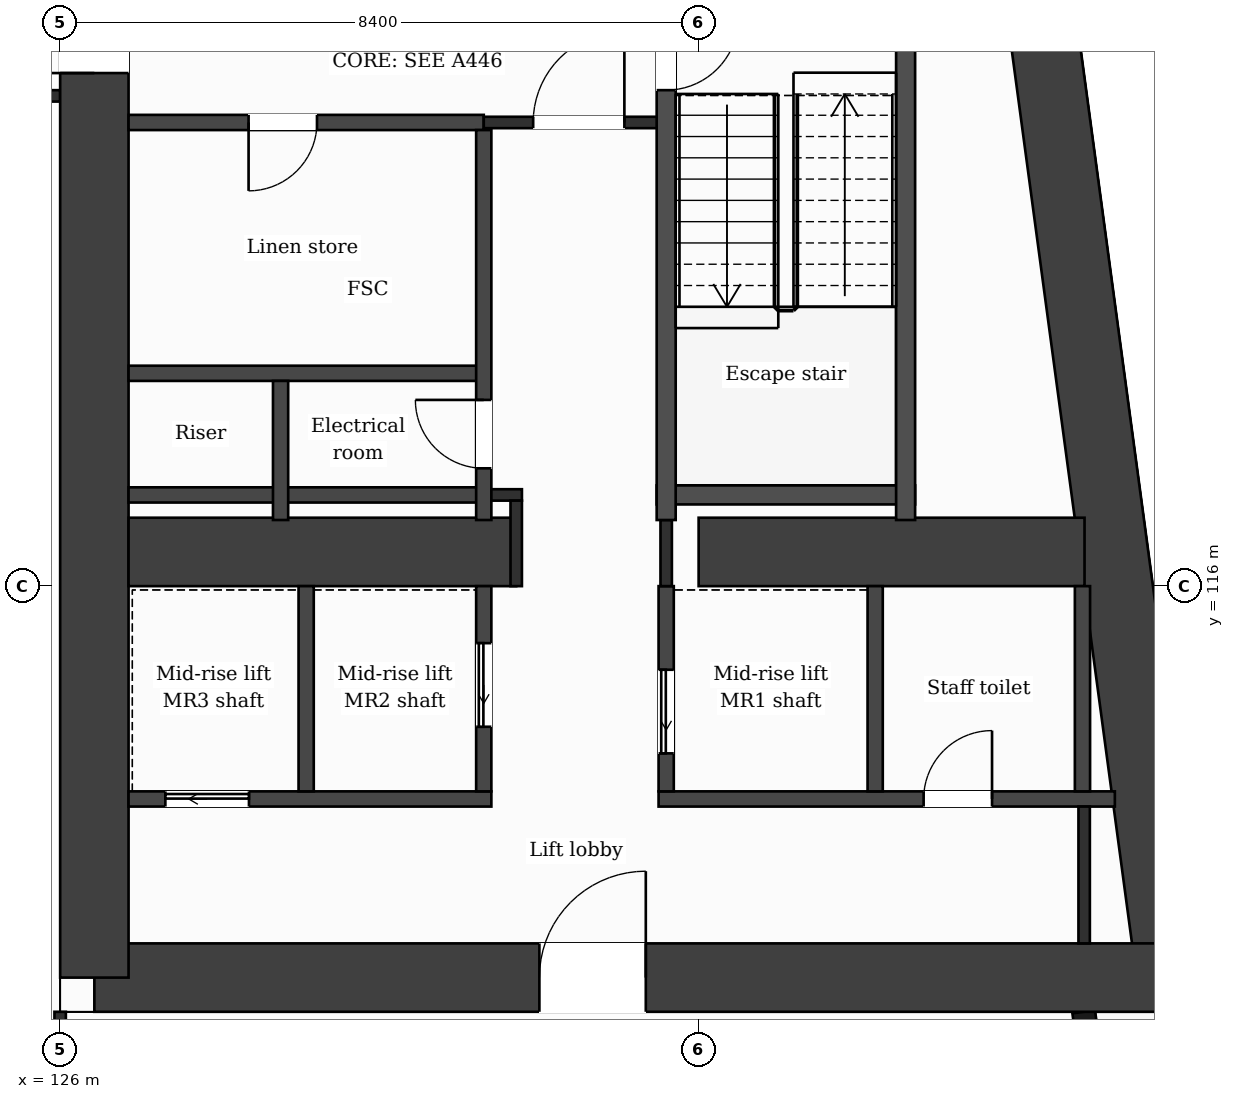
"""IFC4 building model, lengths in metres.
Left out: names, types, materials, properties, quantities, classifications, styles, units other than length and angle.
Written with IfcOpenShell. Run it as: python <this file> out.ifc"""

import sys

from ifc_helpers import new_model, si_unit, direction, frame, frame_2d, origin, place, context, subcontext, project, spatial, rectangle, extrude, element, fill, save


model = new_model("IFC4")
c1 = context("Model", 3, precision=1e-05, world=origin(), true_north=direction((0.0, 1.0)))
c2 = subcontext(c1, "Body", "Model", "MODEL_VIEW")
j1 = project(units=[si_unit("LENGTHUNIT", "METRE"), si_unit("PLANEANGLEUNIT", "RADIAN")], contexts=[c1])
p1 = place(None, origin())
s1 = spatial("IfcSite", under=j1, at=p1, CompositionType="ELEMENT")
p2 = place(p1, origin())
s2 = spatial("IfcBuilding", under=s1, at=p2, CompositionType="ELEMENT")
p3 = place(p2, frame((0.0, 0.0, 188.5)))
s3 = spatial("IfcBuildingStorey", under=s2, at=p3, CompositionType="ELEMENT", Elevation=188.5)
p4 = place(p3, frame((137.776, 131.95, 0.0), z_axis=(0.0, 0.0, 1.0), x_axis=(0.133421759112, -0.991059349482, 0.0)))
e1 = element("IfcWall", 1, at=p4, inside=s3, PredefinedType="SHEAR", context=c2, shape_type="SweptSolid", body=[
    extrude(rectangle(XDim=21.29, YDim=0.9, at=frame_2d((10.645, 0.0))), origin(), (0.0, 0.0, 1.0), 3.7),
])
p5 = place(p3, frame((140.616, 110.85, 0.0), z_axis=(0.0, 0.0, 1.0), x_axis=(-1.0, 0.0, 0.0)))
e2 = element("IfcWall", 2, at=p5, inside=s3, PredefinedType="SHEAR", context=c2, shape_type="SweptSolid", body=[
    extrude(rectangle(XDim=14.166, YDim=0.9, at=frame_2d((7.083, 0.0))), origin(), (0.0, 0.0, 1.0), 3.7),
])
p6 = place(p5, frame((6.911, 0.0, 0.0)))
e3 = element("IfcOpeningElement", 3, at=p6, cuts=e2, PredefinedType="OPENING", context=c2, shape_type="SweptSolid", body=[
    extrude(rectangle(XDim=1.4, YDim=2.1, at=frame_2d((0.7, 1.05))), frame((0.0, 0.46, 0.0), z_axis=(0.0, -1.0, 0.0), x_axis=(1.0, 0.0, 0.0)), (0.0, 0.0, 1.0), 0.92),
])
p7 = place(p3, frame((126.45, 110.85, 0.0), z_axis=(0.0, 0.0, 1.0), x_axis=(0.0, 1.0, 0.0)))
e4 = element("IfcWall", 4, at=p7, inside=s3, PredefinedType="SHEAR", context=c2, shape_type="SweptSolid", body=[
    extrude(rectangle(XDim=21.1, YDim=0.9, at=frame_2d((10.55, 0.0))), origin(), (0.0, 0.0, 1.0), 3.7),
])
p8 = place(p7, frame((11.9, 0.0, 0.0)))
e5 = element("IfcOpeningElement", 5, at=p8, cuts=e4, PredefinedType="OPENING", context=c2, shape_type="SweptSolid", body=[
    extrude(rectangle(XDim=1.4, YDim=2.1, at=frame_2d((0.7, 1.05))), frame((0.0, 0.46, 0.0), z_axis=(0.0, -1.0, 0.0), x_axis=(1.0, 0.0, 0.0)), (0.0, 0.0, 1.0), 0.92),
])
p9 = place(p3, frame((126.9, 116.45, 0.0), z_axis=(0.0, 0.0, 1.0), x_axis=(1.0, 0.0, 0.0)))
e6 = element("IfcWall", 6, at=p9, inside=s3, PredefinedType="SHEAR", context=c2, shape_type="SweptSolid", body=[
    extrude(rectangle(XDim=5.1, YDim=0.9, at=frame_2d((2.55, 0.0))), origin(), (0.0, 0.0, 1.0), 3.7),
])
p10 = place(p3, frame((134.4, 116.45, 0.0), z_axis=(0.0, 0.0, 1.0), x_axis=(1.0, 0.0, 0.0)))
e7 = element("IfcWall", 7, at=p10, inside=s3, PredefinedType="SHEAR", context=c2, shape_type="SweptSolid", body=[
    extrude(rectangle(XDim=5.077, YDim=0.9, at=frame_2d((2.539, 0.0))), origin(), (0.0, 0.0, 1.0), 3.7),
])
p11 = place(p3, frame((140.348, 103.85, 0.0), z_axis=(0.0, 0.0, 1.0), x_axis=(-0.133431549479, 0.991058031401, 0.0)))
e8 = element("IfcWall", 8, at=p11, inside=s3, PredefinedType="SOLIDWALL", context=c2, shape_type="SweptSolid", body=[
    extrude(rectangle(XDim=6.609, YDim=0.3, at=frame_2d((3.304, 0.0))), origin(), (0.0, 0.0, 1.0), 3.25),
])
p12 = place(p11, frame((0.737, 0.0, 0.9)))
e9 = element("IfcOpeningElement", 9, at=p12, cuts=e8, PredefinedType="OPENING", context=c2, shape_type="SweptSolid", body=[
    extrude(rectangle(XDim=1.2, YDim=2.1, at=frame_2d((0.6, 1.05))), frame((0.0, 0.16, 0.0), z_axis=(0.0, -1.0, 0.0), x_axis=(1.0, 0.0, 0.0)), (0.0, 0.0, 1.0), 0.32),
])
p13 = place(p11, frame((3.991, 0.0, 0.0)))
e10 = element("IfcOpeningElement", 10, at=p13, cuts=e8, PredefinedType="OPENING", context=c2, shape_type="SweptSolid", body=[
    extrude(rectangle(XDim=1.2, YDim=2.4, at=frame_2d((0.6, 1.2))), frame((0.0, 0.16, 0.0), z_axis=(0.0, -1.0, 0.0), x_axis=(1.0, 0.0, 0.0)), (0.0, 0.0, 1.0), 0.32),
])
p14 = place(p3, frame((126.9, 113.2, 0.0), z_axis=(0.0, 0.0, 1.0), x_axis=(1.0, 0.0, 0.0)))
e11 = element("IfcWall", 11, at=p14, inside=s3, PredefinedType="PARTITIONING", context=c2, shape_type="SweptSolid", body=[
    extrude(rectangle(XDim=4.773, YDim=0.2, at=frame_2d((2.387, 0.0))), origin(), (0.0, 0.0, 1.0), 3.25),
])
p15 = place(p14, frame((0.484, 0.0, 0.0)))
e12 = element("IfcOpeningElement", 12, at=p15, cuts=e11, PredefinedType="OPENING", context=c2, shape_type="SweptSolid", body=[
    extrude(rectangle(XDim=1.1, YDim=2.1, at=frame_2d((0.55, 1.05))), frame((0.0, 0.11, 0.0), z_axis=(0.0, -1.0, 0.0), x_axis=(1.0, 0.0, 0.0)), (0.0, 0.0, 1.0), 0.22),
])
p16 = place(p3, frame((133.873, 113.2, 0.0), z_axis=(0.0, 0.0, 1.0), x_axis=(1.0, 0.0, 0.0)))
e13 = element("IfcWall", 13, at=p16, inside=s3, PredefinedType="PARTITIONING", context=c2, shape_type="SweptSolid", body=[
    extrude(rectangle(XDim=6.003, YDim=0.2, at=frame_2d((3.001, 0.0))), origin(), (0.0, 0.0, 1.0), 3.25),
])
p17 = place(p16, frame((3.487, 0.0, 0.0)))
e14 = element("IfcOpeningElement", 14, at=p17, cuts=e13, PredefinedType="OPENING", context=c2, shape_type="SweptSolid", body=[
    extrude(rectangle(XDim=0.9, YDim=2.1, at=frame_2d((0.45, 1.05))), frame((0.0, 0.11, 0.0), z_axis=(0.0, -1.0, 0.0), x_axis=(1.0, 0.0, 0.0)), (0.0, 0.0, 1.0), 0.22),
])
p18 = place(p3, frame((126.9, 117.2, 0.0), z_axis=(0.0, 0.0, 1.0), x_axis=(1.0, 0.0, 0.0)))
e15 = element("IfcWall", 15, at=p18, inside=s3, PredefinedType="PARTITIONING", context=c2, shape_type="SweptSolid", body=[
    extrude(rectangle(XDim=4.673, YDim=0.2, at=frame_2d((2.336, 0.0))), origin(), (0.0, 0.0, 1.0), 3.25),
])
p19 = place(p3, frame((131.573, 117.2, 0.0), z_axis=(0.0, 0.0, 1.0), x_axis=(1.0, 0.0, 0.0)))
e16 = element("IfcWall", 16, at=p19, inside=s3, PredefinedType="PARTITIONING", context=c2, shape_type="SweptSolid", body=[
    extrude(rectangle(XDim=0.502, YDim=0.15, at=frame_2d((0.251, 0.0))), origin(), (0.0, 0.0, 1.0), 3.25),
])
p20 = place(p3, frame((133.848, 117.2, 0.0), z_axis=(0.0, 0.0, 1.0), x_axis=(1.0, 0.0, 0.0)))
e17 = element("IfcWall", 17, at=p20, inside=s3, PredefinedType="PARTITIONING", context=c2, shape_type="SweptSolid", body=[
    extrude(rectangle(XDim=3.4, YDim=0.25, at=frame_2d((1.7, 0.0))), origin(), (0.0, 0.0, 1.0), 3.25),
])
p21 = place(p3, frame((126.9, 118.8, 0.0), z_axis=(0.0, 0.0, 1.0), x_axis=(1.0, 0.0, 0.0)))
e18 = element("IfcWall", 18, at=p21, inside=s3, PredefinedType="PARTITIONING", context=c2, shape_type="SweptSolid", body=[
    extrude(rectangle(XDim=4.673, YDim=0.2, at=frame_2d((2.336, 0.0))), origin(), (0.0, 0.0, 1.0), 3.25),
])
p22 = place(p3, frame((126.9, 122.1, 0.0), z_axis=(0.0, 0.0, 1.0), x_axis=(1.0, 0.0, 0.0)))
e19 = element("IfcWall", 19, at=p22, inside=s3, PredefinedType="PARTITIONING", context=c2, shape_type="SweptSolid", body=[
    extrude(rectangle(XDim=4.673, YDim=0.2, at=frame_2d((2.336, 0.0))), origin(), (0.0, 0.0, 1.0), 3.25),
])
p23 = place(p22, frame((1.579, 0.0, 0.0)))
e20 = element("IfcOpeningElement", 20, at=p23, cuts=e19, PredefinedType="OPENING", context=c2, shape_type="SweptSolid", body=[
    extrude(rectangle(XDim=0.9, YDim=2.1, at=frame_2d((0.45, 1.05))), frame((0.0, 0.11, 0.0), z_axis=(0.0, -1.0, 0.0), x_axis=(1.0, 0.0, 0.0)), (0.0, 0.0, 1.0), 0.22),
])
p24 = place(p3, frame((131.573, 122.1, 0.0), z_axis=(0.0, 0.0, 1.0), x_axis=(1.0, 0.0, 0.0)))
e21 = element("IfcWall", 21, at=p24, inside=s3, PredefinedType="PARTITIONING", context=c2, shape_type="SweptSolid", body=[
    extrude(rectangle(XDim=2.4, YDim=0.15, at=frame_2d((1.2, 0.0))), origin(), (0.0, 0.0, 1.0), 3.25),
])
p25 = place(p24, frame((0.65, 0.0, 0.0)))
e22 = element("IfcOpeningElement", 22, at=p25, cuts=e21, PredefinedType="OPENING", context=c2, shape_type="SweptSolid", body=[
    extrude(rectangle(XDim=1.2, YDim=2.1, at=frame_2d((0.6, 1.05))), frame((0.0, 0.085, 0.0), z_axis=(0.0, -1.0, 0.0), x_axis=(1.0, 0.0, 0.0)), (0.0, 0.0, 1.0), 0.17),
])
p26 = place(p3, frame((100.8, 122.45, 0.0), z_axis=(0.0, 0.0, 1.0), x_axis=(1.0, 0.0, 0.0)))
e23 = element("IfcWall", 23, at=p26, inside=s3, PredefinedType="PARTITIONING", context=c2, shape_type="SweptSolid", body=[
    extrude(rectangle(XDim=25.2, YDim=0.15, at=frame_2d((12.6, 0.0))), origin(), (0.0, 0.0, 1.0), 3.25),
])
p27 = place(p3, frame((126.0, 109.075, 0.0), z_axis=(0.0, 0.0, 1.0), x_axis=(0.0, 1.0, 0.0)))
e24 = element("IfcWall", 24, at=p27, inside=s3, PredefinedType="PARTITIONING", context=c2, shape_type="SweptSolid", body=[
    extrude(rectangle(XDim=1.325, YDim=0.15, at=frame_2d((0.663, 0.0))), origin(), (0.0, 0.0, 1.0), 3.25),
])
p28 = place(p3, frame((128.9, 116.87, 0.0), z_axis=(0.0, 0.0, 1.0), x_axis=(0.0, 1.0, 0.0)))
e25 = element("IfcWall", 25, at=p28, inside=s3, PredefinedType="PARTITIONING", context=c2, shape_type="SweptSolid", body=[
    extrude(rectangle(XDim=1.83, YDim=0.2, at=frame_2d((0.915, 0.0))), origin(), (0.0, 0.0, 1.0), 3.25),
])
p29 = place(p3, frame((129.237, 113.3, 0.0), z_axis=(0.0, 0.0, 1.0), x_axis=(0.0, 1.0, 0.0)))
e26 = element("IfcWall", 26, at=p29, inside=s3, PredefinedType="PARTITIONING", context=c2, shape_type="SweptSolid", body=[
    extrude(rectangle(XDim=2.7, YDim=0.2, at=frame_2d((1.35, 0.0))), origin(), (0.0, 0.0, 1.0), 3.25),
])
p30 = place(p3, frame((131.573, 113.3, 0.0), z_axis=(0.0, 0.0, 1.0), x_axis=(0.0, 1.0, 0.0)))
e27 = element("IfcWall", 27, at=p30, inside=s3, PredefinedType="PARTITIONING", context=c2, shape_type="SweptSolid", body=[
    extrude(rectangle(XDim=2.7, YDim=0.2, at=frame_2d((1.35, 0.0))), origin(), (0.0, 0.0, 1.0), 3.25),
])
p31 = place(p30, frame((0.85, 0.0, 0.0)))
e28 = element("IfcOpeningElement", 28, at=p31, cuts=e27, PredefinedType="OPENING", context=c2, shape_type="SweptSolid", body=[
    extrude(rectangle(XDim=1.1, YDim=2.1, at=frame_2d((0.55, 1.05))), frame((0.0, 0.11, 0.0), z_axis=(0.0, -1.0, 0.0), x_axis=(1.0, 0.0, 0.0)), (0.0, 0.0, 1.0), 0.22),
])
p32 = place(p3, frame((131.573, 116.87, 0.0), z_axis=(0.0, 0.0, 1.0), x_axis=(0.0, 1.0, 0.0)))
e29 = element("IfcWall", 29, at=p32, inside=s3, PredefinedType="PARTITIONING", context=c2, shape_type="SweptSolid", body=[
    extrude(rectangle(XDim=5.13, YDim=0.2, at=frame_2d((2.565, 0.0))), origin(), (0.0, 0.0, 1.0), 3.25),
])
p33 = place(p32, frame((0.68, 0.0, 0.0)))
e30 = element("IfcOpeningElement", 30, at=p33, cuts=e29, PredefinedType="OPENING", context=c2, shape_type="SweptSolid", body=[
    extrude(rectangle(XDim=0.9, YDim=2.1, at=frame_2d((0.45, 1.05))), frame((0.0, 0.11, 0.0), z_axis=(0.0, -1.0, 0.0), x_axis=(1.0, 0.0, 0.0)), (0.0, 0.0, 1.0), 0.22),
])
p34 = place(p3, frame((132.0, 116.0, 0.0), z_axis=(0.0, 0.0, 1.0), x_axis=(0.0, 1.0, 0.0)))
e31 = element("IfcWall", 31, at=p34, inside=s3, PredefinedType="PARTITIONING", context=c2, shape_type="SweptSolid", body=[
    extrude(rectangle(XDim=1.125, YDim=0.15, at=frame_2d((0.562, 0.0))), origin(), (0.0, 0.0, 1.0), 3.25),
])
p35 = place(p3, frame((133.973, 113.3, 0.0), z_axis=(0.0, 0.0, 1.0), x_axis=(0.0, 1.0, 0.0)))
e32 = element("IfcWall", 32, at=p35, inside=s3, PredefinedType="PARTITIONING", context=c2, shape_type="SweptSolid", body=[
    extrude(rectangle(XDim=2.7, YDim=0.2, at=frame_2d((1.35, 0.0))), origin(), (0.0, 0.0, 1.0), 3.25),
])
p36 = place(p35, frame((0.5, 0.0, 0.0)))
e33 = element("IfcOpeningElement", 33, at=p36, cuts=e32, PredefinedType="OPENING", context=c2, shape_type="SweptSolid", body=[
    extrude(rectangle(XDim=1.1, YDim=2.1, at=frame_2d((0.55, 1.05))), frame((0.0, 0.11, 0.0), z_axis=(0.0, -1.0, 0.0), x_axis=(1.0, 0.0, 0.0)), (0.0, 0.0, 1.0), 0.22),
])
p37 = place(p3, frame((133.973, 116.0, 0.0), z_axis=(0.0, 0.0, 1.0), x_axis=(0.0, 1.0, 0.0)))
e34 = element("IfcWall", 34, at=p37, inside=s3, PredefinedType="PARTITIONING", context=c2, shape_type="SweptSolid", body=[
    extrude(rectangle(XDim=0.87, YDim=0.15, at=frame_2d((0.435, 0.0))), origin(), (0.0, 0.0, 1.0), 3.25),
])
p38 = place(p3, frame((133.973, 116.87, 0.0), z_axis=(0.0, 0.0, 1.0), x_axis=(0.0, 1.0, 0.0)))
e35 = element("IfcWall", 35, at=p38, inside=s3, PredefinedType="PARTITIONING", context=c2, shape_type="SweptSolid", body=[
    extrude(rectangle(XDim=6.955, YDim=0.25, at=frame_2d((3.478, 0.0))), origin(), (0.0, 0.0, 1.0), 3.25),
])
p39 = place(p38, frame((5.655, 0.0, 0.0)))
e36 = element("IfcOpeningElement", 36, at=p39, cuts=e35, PredefinedType="OPENING", context=c2, shape_type="SweptSolid", body=[
    extrude(rectangle(XDim=0.95, YDim=2.1, at=frame_2d((0.475, 1.05))), frame((0.0, 0.135, 0.0), z_axis=(0.0, -1.0, 0.0), x_axis=(1.0, 0.0, 0.0)), (0.0, 0.0, 1.0), 0.27),
])
p40 = place(p3, frame((136.722, 113.3, 0.0), z_axis=(0.0, 0.0, 1.0), x_axis=(0.0, 1.0, 0.0)))
e37 = element("IfcWall", 37, at=p40, inside=s3, PredefinedType="PARTITIONING", context=c2, shape_type="SweptSolid", body=[
    extrude(rectangle(XDim=2.7, YDim=0.2, at=frame_2d((1.35, 0.0))), origin(), (0.0, 0.0, 1.0), 3.25),
])
p41 = place(p3, frame((137.123, 116.87, 0.0), z_axis=(0.0, 0.0, 1.0), x_axis=(0.0, 1.0, 0.0)))
e38 = element("IfcWall", 38, at=p41, inside=s3, PredefinedType="PARTITIONING", context=c2, shape_type="SweptSolid", body=[
    extrude(rectangle(XDim=6.955, YDim=0.25, at=frame_2d((3.478, 0.0))), origin(), (0.0, 0.0, 1.0), 3.25),
])
p42 = place(p3, frame((139.45, 113.3, 0.0), z_axis=(0.0, 0.0, 1.0), x_axis=(0.0, 1.0, 0.0)))
e39 = element("IfcWall", 39, at=p42, inside=s3, PredefinedType="PARTITIONING", context=c2, shape_type="SweptSolid", body=[
    extrude(rectangle(XDim=2.7, YDim=0.2, at=frame_2d((1.35, 0.0))), origin(), (0.0, 0.0, 1.0), 3.25),
])
p43 = place(p3, frame((139.472, 111.3, 0.0), z_axis=(0.0, 0.0, 1.0), x_axis=(0.0, 1.0, 0.0)))
e40 = element("IfcWall", 40, at=p43, inside=s3, PredefinedType="PARTITIONING", context=c2, shape_type="SweptSolid", body=[
    extrude(rectangle(XDim=1.8, YDim=0.15, at=frame_2d((0.9, 0.0))), origin(), (0.0, 0.0, 1.0), 3.25),
])
p44 = place(p25, origin())
e41 = element("IfcDoor", 41, at=p44, inside=s3, OperationType="SINGLE_SWING_RIGHT", PredefinedType="DOOR", context=c2, shape_type="SweptSolid", body=[
    extrude(rectangle(XDim=1.2, YDim=2.1, at=frame_2d((0.6, 1.05))), frame((0.0, 0.025, 0.0), z_axis=(0.0, -1.0, 0.0), x_axis=(1.0, 0.0, 0.0)), (0.0, 0.0, 1.0), 0.05),
])
fill(e22, e41)
p45 = place(p23, origin())
e42 = element("IfcDoor", 42, at=p45, inside=s3, OperationType="SINGLE_SWING_LEFT", PredefinedType="DOOR", context=c2, shape_type="SweptSolid", body=[
    extrude(rectangle(XDim=0.9, YDim=2.1, at=frame_2d((0.45, 1.05))), frame((0.0, 0.025, 0.0), z_axis=(0.0, -1.0, 0.0), x_axis=(1.0, 0.0, 0.0)), (0.0, 0.0, 1.0), 0.05),
])
fill(e20, e42)
p46 = place(p39, origin())
e43 = element("IfcDoor", 43, at=p46, inside=s3, OperationType="SINGLE_SWING_RIGHT", PredefinedType="DOOR", context=c2, shape_type="SweptSolid", body=[
    extrude(rectangle(XDim=0.95, YDim=2.1, at=frame_2d((0.475, 1.05))), frame((0.0, 0.025, 0.0), z_axis=(0.0, -1.0, 0.0), x_axis=(1.0, 0.0, 0.0)), (0.0, 0.0, 1.0), 0.05),
])
fill(e36, e43)
p47 = place(p33, origin())
e44 = element("IfcDoor", 44, at=p47, inside=s3, OperationType="SINGLE_SWING_RIGHT", PredefinedType="DOOR", context=c2, shape_type="SweptSolid", body=[
    extrude(rectangle(XDim=0.9, YDim=2.1, at=frame_2d((0.45, 1.05))), frame((0.0, 0.025, 0.0), z_axis=(0.0, -1.0, 0.0), x_axis=(1.0, 0.0, 0.0)), (0.0, 0.0, 1.0), 0.05),
])
fill(e30, e44)
p48 = place(p36, origin())
e45 = element("IfcDoor", 45, at=p48, inside=s3, OperationType="SLIDING_TO_LEFT", PredefinedType="DOOR", context=c2, shape_type="SweptSolid", body=[
    extrude(rectangle(XDim=1.1, YDim=2.1, at=frame_2d((0.55, 1.05))), frame((0.0, 0.025, 0.0), z_axis=(0.0, -1.0, 0.0), x_axis=(1.0, 0.0, 0.0)), (0.0, 0.0, 1.0), 0.05),
])
fill(e33, e45)
p49 = place(p31, origin())
e46 = element("IfcDoor", 46, at=p49, inside=s3, OperationType="SLIDING_TO_LEFT", PredefinedType="DOOR", context=c2, shape_type="SweptSolid", body=[
    extrude(rectangle(XDim=1.1, YDim=2.1, at=frame_2d((0.55, 1.05))), frame((0.0, 0.025, 0.0), z_axis=(0.0, -1.0, 0.0), x_axis=(1.0, 0.0, 0.0)), (0.0, 0.0, 1.0), 0.05),
])
fill(e28, e46)
p50 = place(p15, origin())
e47 = element("IfcDoor", 47, at=p50, inside=s3, OperationType="SLIDING_TO_LEFT", PredefinedType="DOOR", context=c2, shape_type="SweptSolid", body=[
    extrude(rectangle(XDim=1.1, YDim=2.1, at=frame_2d((0.55, 1.05))), frame((0.0, 0.025, 0.0), z_axis=(0.0, -1.0, 0.0), x_axis=(1.0, 0.0, 0.0)), (0.0, 0.0, 1.0), 0.05),
])
fill(e12, e47)
p51 = place(p17, origin())
e48 = element("IfcDoor", 48, at=p51, inside=s3, OperationType="SINGLE_SWING_RIGHT", PredefinedType="DOOR", context=c2, shape_type="SweptSolid", body=[
    extrude(rectangle(XDim=0.9, YDim=2.1, at=frame_2d((0.45, 1.05))), frame((0.0, 0.025, 0.0), z_axis=(0.0, -1.0, 0.0), x_axis=(1.0, 0.0, 0.0)), (0.0, 0.0, 1.0), 0.05),
])
fill(e14, e48)
p52 = place(p6, origin())
e49 = element("IfcDoor", 49, at=p52, inside=s3, OperationType="SINGLE_SWING_LEFT", PredefinedType="DOOR", context=c2, shape_type="SweptSolid", body=[
    extrude(rectangle(XDim=1.4, YDim=2.1, at=frame_2d((0.7, 1.05))), frame((0.0, 0.025, 0.0), z_axis=(0.0, -1.0, 0.0), x_axis=(1.0, 0.0, 0.0)), (0.0, 0.0, 1.0), 0.05),
])
fill(e3, e49)
p53 = place(p8, origin())
e50 = element("IfcDoor", 50, at=p53, inside=s3, OperationType="SINGLE_SWING_LEFT", PredefinedType="DOOR", context=c2, shape_type="SweptSolid", body=[
    extrude(rectangle(XDim=1.4, YDim=2.1, at=frame_2d((0.7, 1.05))), frame((0.0, 0.025, 0.0), z_axis=(0.0, -1.0, 0.0), x_axis=(1.0, 0.0, 0.0)), (0.0, 0.0, 1.0), 0.05),
])
fill(e5, e50)
save(model, sys.argv[1])
